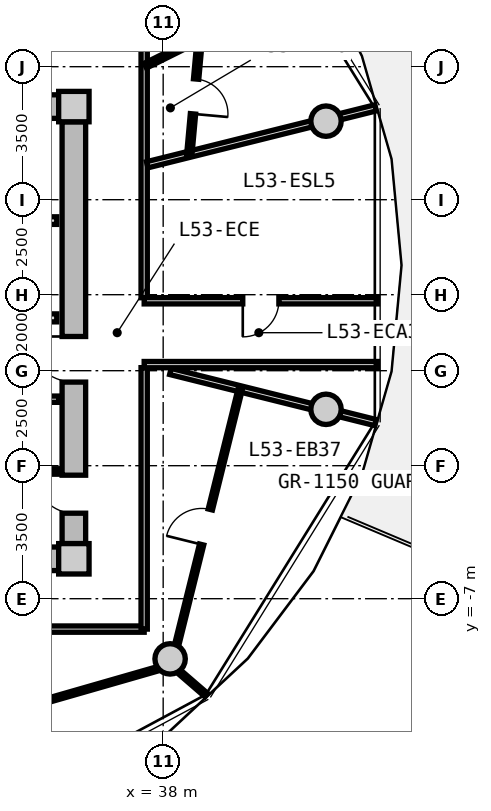
"""IFC4 building model, lengths in metres.
Left out: names, types, materials, properties, quantities, classifications, styles, units other than length and angle.
Written with IfcOpenShell. Run it as: python <this file> out.ifc"""

import sys

from ifc_helpers import new_model, si_unit, direction, frame, frame_2d, origin, origin_2d, place, context, subcontext, project, spatial, rectangle, circle, extrude, source, transform, mapped, element, fill, save


model = new_model("IFC4")
c1 = context("Model", 3, precision=1e-05, world=origin(), true_north=direction((0.0, 1.0)))
c2 = subcontext(c1, "Body", "Model", "MODEL_VIEW")
j1 = project(units=[si_unit("LENGTHUNIT", "METRE"), si_unit("PLANEANGLEUNIT", "RADIAN")], contexts=[c1])
p1 = place(None, origin())
s1 = spatial("IfcSite", under=j1, at=p1, CompositionType="ELEMENT")
p2 = place(p1, origin())
s2 = spatial("IfcBuilding", under=s1, at=p2, CompositionType="ELEMENT")
p3 = place(p2, frame((0.0, 0.0, 170.9)))
s3 = spatial("IfcBuildingStorey", under=s2, at=p3, CompositionType="ELEMENT", Elevation=170.9)
m1 = source(origin(), c2, "Body", "SweptSolid", [
    extrude(rectangle(XDim=0.8, YDim=0.8, at=origin_2d()), origin(), (0.0, 0.0, 1.0), 3.05),
])
for number, where, z_axis, x_axis in (
    (1, (35.65, -5.95, 0.0), (0.0, 0.0, 1.0), (1.0, 0.0, 0.0)),
    (2, (35.65, 5.95, 0.0), (0.0, 0.0, 1.0), (1.0, 0.0, 0.0)),
):
    element("IfcColumn", number, at=place(p3, frame(where, z_axis=z_axis, x_axis=x_axis)), inside=s3, PredefinedType="COLUMN", context=c2, shape_type="MappedRepresentation", body=[
        mapped(m1, transform((0.0, 0.0, 0.0), x_axis=(1.0, 0.0, 0.0), y_axis=(0.0, 1.0, 0.0), z_axis=(0.0, 0.0, 1.0), scale=1.0)),
    ])
m2 = source(origin(), c2, "Body", "SweptSolid", [
    extrude(rectangle(XDim=14.5, YDim=0.62, at=frame_2d((7.25, 0.0))), origin(), (0.0, 0.0, 1.0), 2.81),
])
for number, where, z_axis, x_axis in (
    (3, (20.75, 5.95, 0.0), (0.0, 0.0, 1.0), (1.0, 0.0, 0.0)),
    (4, (35.25, -5.95, 0.0), (0.0, 0.0, 1.0), (-1.0, 0.0, 0.0)),
):
    element("IfcWall", number, at=place(p3, frame(where, z_axis=z_axis, x_axis=x_axis)), inside=s3, PredefinedType="SHEAR", context=c2, shape_type="MappedRepresentation", body=[
        mapped(m2, transform((0.0, 0.0, 0.0), x_axis=(1.0, 0.0, 0.0), y_axis=(0.0, 1.0, 0.0), z_axis=(0.0, 0.0, 1.0), scale=1.0)),
    ])
m3 = source(origin(), c2, "Body", "SweptSolid", [
    extrude(rectangle(XDim=11.1, YDim=0.62, at=frame_2d((5.55, 0.0))), origin(), (0.0, 0.0, 1.0), 2.81),
])
p4 = place(p3, frame((35.65, 5.55, 0.0), z_axis=(0.0, 0.0, 1.0), x_axis=(0.0, -1.0, 0.0)))
e5 = element("IfcWall", 5, at=p4, inside=s3, PredefinedType="SHEAR", context=c2, shape_type="MappedRepresentation", body=[
    mapped(m3, transform((0.0, 0.0, 0.0), x_axis=(1.0, 0.0, 0.0), y_axis=(0.0, 1.0, 0.0), z_axis=(0.0, 0.0, 1.0), scale=1.0)),
])
p5 = place(p4, frame((5.65, 0.0, 0.0)))
e6 = element("IfcOpeningElement", 6, at=p5, cuts=e5, PredefinedType="OPENING", context=c2, shape_type="SweptSolid", body=[
    extrude(rectangle(XDim=1.2, YDim=2.15, at=frame_2d((0.6, 1.075))), frame((0.0, 0.32, 0.0), z_axis=(0.0, -1.0, 0.0), x_axis=(1.0, 0.0, 0.0)), (0.0, 0.0, 1.0), 0.64),
])
p6 = place(p4, frame((9.3, 0.0, 0.0)))
e7 = element("IfcOpeningElement", 7, at=p6, cuts=e5, PredefinedType="OPENING", context=c2, shape_type="SweptSolid", body=[
    extrude(rectangle(XDim=1.0, YDim=2.1, at=frame_2d((0.5, 1.05))), frame((0.0, 0.32, 0.0), z_axis=(0.0, -1.0, 0.0), x_axis=(1.0, 0.0, 0.0)), (0.0, 0.0, 1.0), 0.64),
])
m4 = source(origin(), c2, "Body", "SweptSolid", [
    extrude(circle(Radius=0.4, at=origin_2d()), origin(), (0.0, 0.0, 1.0), 3.05),
])
for number, where, z_axis, x_axis in (
    (8, (42.285, 5.567, 0.0), (0.0, 0.0, 1.0), (1.0, 0.0, 0.0)),
    (9, (38.183, -8.584, 0.0), (0.0, 0.0, 1.0), (1.0, 0.0, 0.0)),
    (10, (42.285, -2.016, 0.0), (0.0, 0.0, 1.0), (1.0, 0.0, 0.0)),
):
    element("IfcColumn", number, at=place(p3, frame(where, z_axis=z_axis, x_axis=x_axis)), inside=s3, PredefinedType="COLUMN", context=c2, shape_type="MappedRepresentation", body=[
        mapped(m4, transform((0.0, 0.0, 0.0), x_axis=(1.0, 0.0, 0.0), y_axis=(0.0, 1.0, 0.0), z_axis=(0.0, 0.0, 1.0), scale=1.0)),
    ])
m5 = source(origin(), c2, "Body", "SweptSolid", [
    extrude(rectangle(XDim=3.2, YDim=0.2, at=frame_2d((1.6, 0.0))), origin(), (0.0, 0.0, 1.0), 2.795),
])
p7 = place(p3, frame((32.0, 2.95, 0.0), z_axis=(0.0, 0.0, 1.0), x_axis=(1.0, 0.0, 0.0)))
e11 = element("IfcWall", 11, at=p7, inside=s3, PredefinedType="PARTITIONING", context=c2, shape_type="MappedRepresentation", body=[
    mapped(m5, transform((0.0, 0.0, 0.0), x_axis=(1.0, 0.0, 0.0), y_axis=(0.0, 1.0, 0.0), z_axis=(0.0, 0.0, 1.0), scale=1.0)),
])
m6 = source(origin(), c2, "Body", "SweptSolid", [
    extrude(rectangle(XDim=6.66, YDim=0.21, at=frame_2d((3.33, 0.0))), origin(), (0.0, 0.0, 1.0), 2.795),
])
p8 = place(p3, frame((28.54, 0.39, 0.0), z_axis=(0.0, 0.0, 1.0), x_axis=(1.0, 0.0, 0.0)))
e12 = element("IfcWall", 12, at=p8, inside=s3, PredefinedType="PARTITIONING", context=c2, shape_type="MappedRepresentation", body=[
    mapped(m6, transform((0.0, 0.0, 0.0), x_axis=(1.0, 0.0, 0.0), y_axis=(0.0, 1.0, 0.0), z_axis=(0.0, 0.0, 1.0), scale=1.0)),
])
p9 = place(p8, frame((1.0, 0.0, 0.0)))
e13 = element("IfcOpeningElement", 13, at=p9, cuts=e12, PredefinedType="OPENING", context=c2, shape_type="SweptSolid", body=[
    extrude(rectangle(XDim=1.2, YDim=2.15, at=frame_2d((0.6, 1.075))), frame((0.0, 0.115, 0.0), z_axis=(0.0, -1.0, 0.0), x_axis=(1.0, 0.0, 0.0)), (0.0, 0.0, 1.0), 0.23),
])
m7 = source(origin(), c2, "Body", "SweptSolid", [
    extrude(rectangle(XDim=2.7, YDim=0.165, at=frame_2d((1.35, 0.0))), origin(), (0.0, 0.0, 1.0), 2.795),
])
p10 = place(p3, frame((32.55, -1.75, 0.0), z_axis=(0.0, 0.0, 1.0), x_axis=(1.0, 0.0, 0.0)))
e14 = element("IfcWall", 14, at=p10, inside=s3, PredefinedType="PARTITIONING", context=c2, shape_type="MappedRepresentation", body=[
    mapped(m7, transform((0.0, 0.0, 0.0), x_axis=(1.0, 0.0, 0.0), y_axis=(0.0, 1.0, 0.0), z_axis=(0.0, 0.0, 1.0), scale=1.0)),
])
p11 = place(p10, frame((0.85, 0.0, 0.0)))
e15 = element("IfcOpeningElement", 15, at=p11, cuts=e14, PredefinedType="OPENING", context=c2, shape_type="SweptSolid", body=[
    extrude(rectangle(XDim=0.925, YDim=2.1, at=frame_2d((0.462, 1.05))), frame((0.0, 0.093, 0.0), z_axis=(0.0, -1.0, 0.0), x_axis=(1.0, 0.0, 0.0)), (0.0, 0.0, 1.0), 0.185),
])
m8 = source(origin(), c2, "Body", "SweptSolid", [
    extrude(rectangle(XDim=2.7, YDim=0.14, at=frame_2d((1.35, 0.0))), origin(), (0.0, 0.0, 1.0), 2.795),
])
p12 = place(p3, frame((32.55, -3.65, 0.0), z_axis=(0.0, 0.0, 1.0), x_axis=(1.0, 0.0, 0.0)))
e16 = element("IfcWall", 16, at=p12, inside=s3, PredefinedType="PARTITIONING", context=c2, shape_type="MappedRepresentation", body=[
    mapped(m8, transform((0.0, 0.0, 0.0), x_axis=(1.0, 0.0, 0.0), y_axis=(0.0, 1.0, 0.0), z_axis=(0.0, 0.0, 1.0), scale=1.0)),
])
m9 = source(origin(), c2, "Body", "SweptSolid", [
    extrude(rectangle(XDim=19.0, YDim=0.165, at=frame_2d((9.5, 0.0))), origin(), (0.0, 0.0, 1.0), 2.795),
])
p13 = place(p3, frame((37.5, -7.8, 0.0), z_axis=(0.0, 0.0, 1.0), x_axis=(-1.0, 0.0, 0.0)))
e17 = element("IfcWall", 17, at=p13, inside=s3, PredefinedType="PARTITIONING", context=c2, shape_type="MappedRepresentation", body=[
    mapped(m9, transform((0.0, 0.0, 0.0), x_axis=(1.0, 0.0, 0.0), y_axis=(0.0, 1.0, 0.0), z_axis=(0.0, 0.0, 1.0), scale=1.0)),
])
p14 = place(p13, frame((8.061, 0.0, 0.0)))
e18 = element("IfcOpeningElement", 18, at=p14, cuts=e17, PredefinedType="OPENING", context=c2, shape_type="SweptSolid", body=[
    extrude(rectangle(XDim=1.05, YDim=2.15, at=frame_2d((0.525, 1.075))), frame((0.0, 0.093, 0.0), z_axis=(0.0, -1.0, 0.0), x_axis=(1.0, 0.0, 0.0)), (0.0, 0.0, 1.0), 0.185),
])
m10 = source(origin(), c2, "Body", "SweptSolid", [
    extrude(rectangle(XDim=6.88, YDim=0.165, at=frame_2d((3.44, 0.0))), origin(), (0.0, 0.0, 1.0), 2.795),
])
for number, where, z_axis, x_axis in (
    (19, (37.5, 7.8, 0.0), (0.0, 0.0, 1.0), (0.0, -1.0, 0.0)),
    (20, (37.5, -0.92, 0.0), (0.0, 0.0, 1.0), (0.0, -1.0, 0.0)),
):
    element("IfcWall", number, at=place(p3, frame(where, z_axis=z_axis, x_axis=x_axis)), inside=s3, PredefinedType="PARTITIONING", context=c2, shape_type="MappedRepresentation", body=[
        mapped(m10, transform((0.0, 0.0, 0.0), x_axis=(1.0, 0.0, 0.0), y_axis=(0.0, 1.0, 0.0), z_axis=(0.0, 0.0, 1.0), scale=1.0)),
    ])
m11 = source(origin(), c2, "Body", "SweptSolid", [
    extrude(rectangle(XDim=5.564, YDim=0.165, at=frame_2d((2.782, 0.0))), origin(), (0.0, 0.0, 1.0), 2.345),
])
p15 = place(p3, frame((38.19, -1.02, 0.0), z_axis=(0.0, 0.0, 1.0), x_axis=(0.97031260977, -0.241854169533, 0.0)))
e21 = element("IfcWall", 21, at=p15, inside=s3, PredefinedType="PARTITIONING", context=c2, shape_type="MappedRepresentation", body=[
    mapped(m11, transform((0.0, 0.0, 0.0), x_axis=(1.0, 0.0, 0.0), y_axis=(0.0, 1.0, 0.0), z_axis=(0.0, 0.0, 1.0), scale=1.0)),
])
m12 = source(origin(), c2, "Body", "SweptSolid", [
    extrude(rectangle(XDim=6.193, YDim=0.165, at=frame_2d((3.096, 0.0))), origin(), (0.0, 0.0, 1.0), 2.345),
])
p16 = place(p3, frame((37.58, 4.419, 0.0), z_axis=(0.0, 0.0, 1.0), x_axis=(0.970309243466, 0.241867674657, 0.0)))
e22 = element("IfcWall", 22, at=p16, inside=s3, PredefinedType="PARTITIONING", context=c2, shape_type="MappedRepresentation", body=[
    mapped(m12, transform((0.0, 0.0, 0.0), x_axis=(1.0, 0.0, 0.0), y_axis=(0.0, 1.0, 0.0), z_axis=(0.0, 0.0, 1.0), scale=1.0)),
])
m13 = source(origin(), c2, "Body", "SweptSolid", [
    extrude(rectangle(XDim=6.139, YDim=0.165, at=frame_2d((3.069, 0.0))), origin(), (0.0, 0.0, 1.0), 2.795),
])
p17 = place(p3, frame((37.5, 0.84, 0.0), z_axis=(0.0, 0.0, 1.0), x_axis=(1.0, 0.0, 0.0)))
e23 = element("IfcWall", 23, at=p17, inside=s3, PredefinedType="PARTITIONING", context=c2, shape_type="MappedRepresentation", body=[
    mapped(m13, transform((0.0, 0.0, 0.0), x_axis=(1.0, 0.0, 0.0), y_axis=(0.0, 1.0, 0.0), z_axis=(0.0, 0.0, 1.0), scale=1.0)),
])
p18 = place(p17, frame((2.594, 0.0, 0.0)))
e24 = element("IfcOpeningElement", 24, at=p18, cuts=e23, PredefinedType="OPENING", context=c2, shape_type="SweptSolid", body=[
    extrude(rectangle(XDim=0.95, YDim=2.1, at=frame_2d((0.475, 1.05))), frame((0.0, 0.093, 0.0), z_axis=(0.0, -1.0, 0.0), x_axis=(1.0, 0.0, 0.0)), (0.0, 0.0, 1.0), 0.185),
])
p19 = place(p3, frame((43.639, -0.84, 0.0), z_axis=(0.0, 0.0, 1.0), x_axis=(-1.0, 0.0, 0.0)))
e25 = element("IfcWall", 25, at=p19, inside=s3, PredefinedType="PARTITIONING", context=c2, shape_type="MappedRepresentation", body=[
    mapped(m13, transform((0.0, 0.0, 0.0), x_axis=(1.0, 0.0, 0.0), y_axis=(0.0, 1.0, 0.0), z_axis=(0.0, 0.0, 1.0), scale=1.0)),
])
m14 = source(origin(), c2, "Body", "SweptSolid", [
    extrude(rectangle(XDim=1.601, YDim=0.14, at=frame_2d((0.801, 0.0))), origin(), (0.0, 0.0, 1.0), 2.795),
])
p20 = place(p3, frame((37.53, 7.026, 0.0), z_axis=(0.0, 0.0, 1.0), x_axis=(0.895279369592, 0.445505163138, 0.0)))
e26 = element("IfcWall", 26, at=p20, inside=s3, PredefinedType="PARTITIONING", context=c2, shape_type="MappedRepresentation", body=[
    mapped(m14, transform((0.0, 0.0, 0.0), x_axis=(1.0, 0.0, 0.0), y_axis=(0.0, 1.0, 0.0), z_axis=(0.0, 0.0, 1.0), scale=1.0)),
])
m15 = source(origin(), c2, "Body", "SweptSolid", [
    extrude(rectangle(XDim=3.058, YDim=0.14, at=frame_2d((1.529, 0.0))), origin(), (0.0, 0.0, 1.0), 2.795),
])
p21 = place(p3, frame((38.964, 7.74, 0.0), z_axis=(0.0, 0.0, 1.0), x_axis=(-0.090060616512, -0.99593628579, 0.0)))
e27 = element("IfcWall", 27, at=p21, inside=s3, PredefinedType="PARTITIONING", context=c2, shape_type="MappedRepresentation", body=[
    mapped(m15, transform((0.0, 0.0, 0.0), x_axis=(1.0, 0.0, 0.0), y_axis=(0.0, 1.0, 0.0), z_axis=(0.0, 0.0, 1.0), scale=1.0)),
])
p22 = place(p21, frame((1.069, 0.0, 0.0)))
e28 = element("IfcOpeningElement", 28, at=p22, cuts=e27, PredefinedType="OPENING", context=c2, shape_type="SweptSolid", body=[
    extrude(rectangle(XDim=0.92, YDim=2.1, at=frame_2d((0.46, 1.05))), frame((0.0, 0.08, 0.0), z_axis=(0.0, -1.0, 0.0), x_axis=(1.0, 0.0, 0.0)), (0.0, 0.0, 1.0), 0.16),
])
m16 = source(origin(), c2, "Body", "SweptSolid", [
    extrude(rectangle(XDim=7.911, YDim=0.115, at=frame_2d((3.955, 0.0))), origin(), (0.0, 0.0, 1.0), 2.345),
])
p23 = place(p3, frame((30.613, -10.927, 0.0), z_axis=(0.0, 0.0, 1.0), x_axis=(0.961104741235, 0.276184134908, 0.0)))
e29 = element("IfcWall", 29, at=p23, inside=s3, PredefinedType="PARTITIONING", context=c2, shape_type="MappedRepresentation", body=[
    mapped(m16, transform((0.0, 0.0, 0.0), x_axis=(1.0, 0.0, 0.0), y_axis=(0.0, 1.0, 0.0), z_axis=(0.0, 0.0, 1.0), scale=1.0)),
])
p24 = place(p23, frame((3.48, 0.0, 0.0)))
e30 = element("IfcOpeningElement", 30, at=p24, cuts=e29, PredefinedType="OPENING", context=c2, shape_type="SweptSolid", body=[
    extrude(rectangle(XDim=0.95, YDim=2.1, at=frame_2d((0.475, 1.05))), frame((0.0, 0.067, 0.0), z_axis=(0.0, -1.0, 0.0), x_axis=(1.0, 0.0, 0.0)), (0.0, 0.0, 1.0), 0.135),
])
m17 = source(origin(), c2, "Body", "SweptSolid", [
    extrude(rectangle(XDim=7.492, YDim=0.115, at=frame_2d((3.746, 0.0))), origin(), (0.0, 0.0, 1.0), 2.345),
])
p25 = place(p3, frame((38.223, -8.749, 0.0), z_axis=(0.0, 0.0, 1.0), x_axis=(0.24104782819, 0.970513237686, 0.0)))
e31 = element("IfcWall", 31, at=p25, inside=s3, PredefinedType="PARTITIONING", context=c2, shape_type="MappedRepresentation", body=[
    mapped(m17, transform((0.0, 0.0, 0.0), x_axis=(1.0, 0.0, 0.0), y_axis=(0.0, 1.0, 0.0), z_axis=(0.0, 0.0, 1.0), scale=1.0)),
])
p26 = place(p25, frame((3.271, 0.0, 0.0)))
e32 = element("IfcOpeningElement", 32, at=p26, cuts=e31, PredefinedType="OPENING", context=c2, shape_type="SweptSolid", body=[
    extrude(rectangle(XDim=0.95, YDim=2.1, at=frame_2d((0.475, 1.05))), frame((0.0, 0.067, 0.0), z_axis=(0.0, -1.0, 0.0), x_axis=(1.0, 0.0, 0.0)), (0.0, 0.0, 1.0), 0.135),
])
m18 = source(origin(), c2, "Body", "SweptSolid", [
    extrude(rectangle(XDim=1.208, YDim=0.115, at=frame_2d((0.604, 0.0))), origin(), (0.0, 0.0, 1.0), 2.795),
])
p27 = place(p3, frame((38.223, -8.749, 0.0), z_axis=(0.0, 0.0, 1.0), x_axis=(0.75668207681, -0.653783018008, 0.0)))
e33 = element("IfcWall", 33, at=p27, inside=s3, PredefinedType="PARTITIONING", context=c2, shape_type="MappedRepresentation", body=[
    mapped(m18, transform((0.0, 0.0, 0.0), x_axis=(1.0, 0.0, 0.0), y_axis=(0.0, 1.0, 0.0), z_axis=(0.0, 0.0, 1.0), scale=1.0)),
])
m19 = source(origin(), c2, "Body", "SweptSolid", [
    extrude(rectangle(XDim=1.2, YDim=2.15, at=frame_2d((0.6, 1.075))), frame((0.0, 0.025, 0.0), z_axis=(0.0, -1.0, 0.0), x_axis=(1.0, 0.0, 0.0)), (0.0, 0.0, 1.0), 0.05),
])
p28 = place(p5, frame((1.2, 0.0, 0.0), z_axis=(0.0, 0.0, 1.0), x_axis=(-1.0, 0.0, 0.0)))
e34 = element("IfcDoor", 34, at=p28, inside=s3, OperationType="SINGLE_SWING_RIGHT", PredefinedType="DOOR", context=c2, shape_type="MappedRepresentation", body=[
    mapped(m19, transform((0.0, 0.0, 0.0), x_axis=(1.0, 0.0, 0.0), y_axis=(0.0, 1.0, 0.0), z_axis=(0.0, 0.0, 1.0), scale=1.0)),
])
fill(e6, e34)
m20 = source(origin(), c2, "Body", "SweptSolid", [
    extrude(rectangle(XDim=1.0, YDim=2.1, at=frame_2d((0.5, 1.05))), frame((0.0, 0.025, 0.0), z_axis=(0.0, -1.0, 0.0), x_axis=(1.0, 0.0, 0.0)), (0.0, 0.0, 1.0), 0.05),
])
p29 = place(p6, frame((1.0, 0.0, 0.0), z_axis=(0.0, 0.0, 1.0), x_axis=(-1.0, 0.0, 0.0)))
e35 = element("IfcDoor", 35, at=p29, inside=s3, OperationType="SINGLE_SWING_RIGHT", PredefinedType="DOOR", context=c2, shape_type="MappedRepresentation", body=[
    mapped(m20, transform((0.0, 0.0, 0.0), x_axis=(1.0, 0.0, 0.0), y_axis=(0.0, 1.0, 0.0), z_axis=(0.0, 0.0, 1.0), scale=1.0)),
])
fill(e7, e35)
m21 = source(origin(), c2, "Body", "SweptSolid", [
    extrude(rectangle(XDim=0.95, YDim=2.1, at=frame_2d((0.475, 1.05))), frame((0.0, 0.025, 0.0), z_axis=(0.0, -1.0, 0.0), x_axis=(1.0, 0.0, 0.0)), (0.0, 0.0, 1.0), 0.05),
])
p30 = place(p18, frame((0.95, 0.0, 0.0), z_axis=(0.0, 0.0, 1.0), x_axis=(-1.0, 0.0, 0.0)))
e36 = element("IfcDoor", 36, at=p30, inside=s3, OperationType="SINGLE_SWING_RIGHT", PredefinedType="DOOR", context=c2, shape_type="MappedRepresentation", body=[
    mapped(m21, transform((0.0, 0.0, 0.0), x_axis=(1.0, 0.0, 0.0), y_axis=(0.0, 1.0, 0.0), z_axis=(0.0, 0.0, 1.0), scale=1.0)),
])
fill(e24, e36)
m22 = source(origin(), c2, "Body", "SweptSolid", [
    extrude(rectangle(XDim=0.92, YDim=2.1, at=frame_2d((0.46, 1.05))), frame((0.0, 0.025, 0.0), z_axis=(0.0, -1.0, 0.0), x_axis=(1.0, 0.0, 0.0)), (0.0, 0.0, 1.0), 0.05),
])
p31 = place(p22, origin())
e37 = element("IfcDoor", 37, at=p31, inside=s3, OperationType="SINGLE_SWING_RIGHT", PredefinedType="DOOR", context=c2, shape_type="MappedRepresentation", body=[
    mapped(m22, transform((0.0, 0.0, 0.0), x_axis=(1.0, 0.0, 0.0), y_axis=(0.0, 1.0, 0.0), z_axis=(0.0, 0.0, 1.0), scale=1.0)),
])
fill(e28, e37)
p32 = place(p26, origin())
e38 = element("IfcDoor", 38, at=p32, inside=s3, OperationType="SINGLE_SWING_LEFT", PredefinedType="DOOR", context=c2, shape_type="MappedRepresentation", body=[
    mapped(m21, transform((0.0, 0.0, 0.0), x_axis=(1.0, 0.0, 0.0), y_axis=(0.0, 1.0, 0.0), z_axis=(0.0, 0.0, 1.0), scale=1.0)),
])
fill(e32, e38)
save(model, sys.argv[1])
